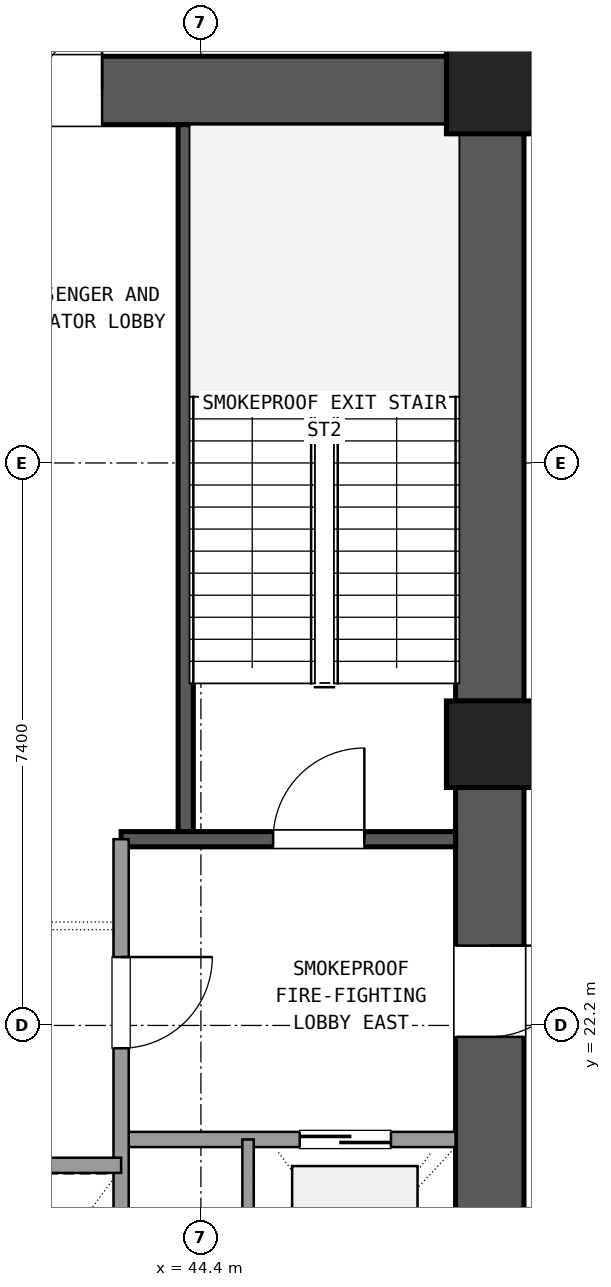
"""IFC4 building model, lengths in metres.
Left out: names, types, materials, properties, quantities, classifications, styles, units other than length and angle.
Written with IfcOpenShell. Run it as: python <this file> out.ifc"""

import sys

from ifc_helpers import new_model, si_unit, direction, frame, frame_2d, origin, origin_2d, place, context, subcontext, project, spatial, rectangle, extrude, element, fill, save


model = new_model("IFC4")
c1 = context("Model", 3, precision=1e-05, world=origin(), true_north=direction((0.0, 1.0)))
c2 = subcontext(c1, "Body", "Model", "MODEL_VIEW")
j1 = project(units=[si_unit("LENGTHUNIT", "METRE"), si_unit("PLANEANGLEUNIT", "RADIAN")], contexts=[c1])
p1 = place(None, origin())
s1 = spatial("IfcSite", under=j1, at=p1, CompositionType="ELEMENT")
p2 = place(p1, origin())
s2 = spatial("IfcBuilding", under=s1, at=p2, CompositionType="ELEMENT")
p3 = place(p2, frame((0.0, 0.0, 18.9)))
s3 = spatial("IfcBuildingStorey", under=s2, at=p3, CompositionType="ELEMENT", Elevation=18.9)
for number, where, z_axis, x_axis in (
    (1, (48.2, 25.9, 0.0), (0.0, 0.0, 1.0), (1.0, 0.0, 0.0)),
    (2, (48.2, 34.5, 0.0), (0.0, 0.0, 1.0), (1.0, 0.0, 0.0)),
):
    element("IfcColumn", number, at=place(p3, frame(where, z_axis=z_axis, x_axis=x_axis)), inside=s3, PredefinedType="COLUMN", context=c2, shape_type="SweptSolid", body=[
        extrude(rectangle(XDim=1.14, YDim=1.14, at=origin_2d()), origin(), (0.0, 0.0, 1.0), 5.04),
    ])
p4 = place(p3, frame((48.2, 17.865, 0.0), z_axis=(0.0, 0.0, 1.0), x_axis=(0.0, 1.0, 0.0)))
e3 = element("IfcWall", 3, at=p4, inside=s3, PredefinedType="SHEAR", context=c2, shape_type="SweptSolid", body=[
    extrude(rectangle(XDim=7.47, YDim=0.9, at=frame_2d((3.735, 0.0))), origin(), (0.0, 0.0, 1.0), 4.76),
])
p5 = place(p4, frame((4.185, 0.0, 0.0)))
e4 = element("IfcOpeningElement", 4, at=p5, cuts=e3, PredefinedType="OPENING", context=c2, shape_type="SweptSolid", body=[
    extrude(rectangle(XDim=1.2, YDim=2.15, at=frame_2d((0.6, 1.075))), frame((0.0, 0.46, 0.0), z_axis=(0.0, -1.0, 0.0), x_axis=(1.0, 0.0, 0.0)), (0.0, 0.0, 1.0), 0.92),
])
p6 = place(p3, frame((48.2, 26.465, 0.0), z_axis=(0.0, 0.0, 1.0), x_axis=(0.0, 1.0, 0.0)))
e5 = element("IfcWall", 5, at=p6, inside=s3, PredefinedType="SHEAR", context=c2, shape_type="SweptSolid", body=[
    extrude(rectangle(XDim=7.47, YDim=0.9, at=frame_2d((3.735, 0.0))), origin(), (0.0, 0.0, 1.0), 4.76),
])
p7 = place(p3, frame((47.635, 34.5, 0.0), z_axis=(0.0, 0.0, 1.0), x_axis=(-1.0, 0.0, 0.0)))
e6 = element("IfcWall", 6, at=p7, inside=s3, PredefinedType="SHEAR", context=c2, shape_type="SweptSolid", body=[
    extrude(rectangle(XDim=10.07, YDim=0.9, at=frame_2d((5.035, 0.0))), origin(), (0.0, 0.0, 1.0), 4.76),
])
p8 = place(p7, frame((4.535, 0.0, 0.0)))
e7 = element("IfcOpeningElement", 7, at=p8, cuts=e6, PredefinedType="OPENING", context=c2, shape_type="SweptSolid", body=[
    extrude(rectangle(XDim=1.6, YDim=2.2, at=frame_2d((0.8, 1.1))), frame((0.0, 0.46, 0.0), z_axis=(0.0, -1.0, 0.0), x_axis=(1.0, 0.0, 0.0)), (0.0, 0.0, 1.0), 0.92),
])
p9 = place(p3, frame((44.2, 24.65, 0.0), z_axis=(0.0, 0.0, 1.0), x_axis=(0.0, 1.0, 0.0)))
e8 = element("IfcWall", 8, at=p9, inside=s3, PredefinedType="SHEAR", context=c2, shape_type="SweptSolid", body=[
    extrude(rectangle(XDim=9.4, YDim=0.2, at=frame_2d((4.7, 0.0))), origin(), (0.0, 0.0, 1.0), 4.76),
])
p10 = place(p3, frame((43.35, 24.65, 0.0), z_axis=(0.0, 0.0, 1.0), x_axis=(1.0, 0.0, 0.0)))
e9 = element("IfcWall", 9, at=p10, inside=s3, PredefinedType="SHEAR", context=c2, shape_type="SweptSolid", body=[
    extrude(rectangle(XDim=4.4, YDim=0.2, at=frame_2d((2.2, 0.0))), origin(), (0.0, 0.0, 1.0), 4.76),
])
p11 = place(p10, frame((2.0, 0.0, 0.0)))
e10 = element("IfcOpeningElement", 10, at=p11, cuts=e9, PredefinedType="OPENING", context=c2, shape_type="SweptSolid", body=[
    extrude(rectangle(XDim=1.2, YDim=2.15, at=frame_2d((0.6, 1.075))), frame((0.0, 0.11, 0.0), z_axis=(0.0, -1.0, 0.0), x_axis=(1.0, 0.0, 0.0)), (0.0, 0.0, 1.0), 0.22),
])
p12 = place(p3, frame((43.35, 20.7, 0.0), z_axis=(0.0, 0.0, 1.0), x_axis=(1.0, 0.0, 0.0)))
e11 = element("IfcWall", 11, at=p12, inside=s3, PredefinedType="SOLIDWALL", context=c2, shape_type="SweptSolid", body=[
    extrude(rectangle(XDim=4.4, YDim=0.2, at=frame_2d((2.2, 0.0))), origin(), (0.0, 0.0, 1.0), 3.13),
])
p13 = place(p12, frame((2.35, 0.0, 0.0)))
e12 = element("IfcOpeningElement", 12, at=p13, cuts=e11, PredefinedType="OPENING", context=c2, shape_type="SweptSolid", body=[
    extrude(rectangle(XDim=1.2, YDim=2.15, at=frame_2d((0.6, 1.075))), frame((0.0, 0.11, 0.0), z_axis=(0.0, -1.0, 0.0), x_axis=(1.0, 0.0, 0.0)), (0.0, 0.0, 1.0), 0.22),
])
p14 = place(p3, frame((43.35, 17.75, 0.0), z_axis=(0.0, 0.0, 1.0), x_axis=(0.0, 1.0, 0.0)))
e13 = element("IfcWall", 13, at=p14, inside=s3, PredefinedType="SOLIDWALL", context=c2, shape_type="SweptSolid", body=[
    extrude(rectangle(XDim=6.9, YDim=0.2, at=frame_2d((3.45, 0.0))), origin(), (0.0, 0.0, 1.0), 3.13),
])
p15 = place(p14, frame((4.15, 0.0, 0.0)))
e14 = element("IfcOpeningElement", 14, at=p15, cuts=e13, PredefinedType="OPENING", context=c2, shape_type="SweptSolid", body=[
    extrude(rectangle(XDim=1.2, YDim=2.15, at=frame_2d((0.6, 1.075))), frame((0.0, 0.11, 0.0), z_axis=(0.0, -1.0, 0.0), x_axis=(1.0, 0.0, 0.0)), (0.0, 0.0, 1.0), 0.22),
])
p16 = place(p3, frame((45.02, 17.75, 0.0), z_axis=(0.0, 0.0, 1.0), x_axis=(0.0, 1.0, 0.0)))
e15 = element("IfcWall", 15, at=p16, inside=s3, PredefinedType="PARTITIONING", context=c2, shape_type="SweptSolid", body=[
    extrude(rectangle(XDim=2.95, YDim=0.15, at=frame_2d((1.475, 0.0))), origin(), (0.0, 0.0, 1.0), 3.13),
])
p17 = place(p3, frame((37.25, 20.36, 0.0), z_axis=(0.0, 0.0, 1.0), x_axis=(1.0, 0.0, 0.0)))
e16 = element("IfcWall", 16, at=p17, inside=s3, PredefinedType="SOLIDWALL", context=c2, shape_type="SweptSolid", body=[
    extrude(rectangle(XDim=6.1, YDim=0.2, at=frame_2d((3.05, 0.0))), origin(), (0.0, 0.0, 1.0), 3.13),
])
p18 = place(p11, origin())
e17 = element("IfcDoor", 17, at=p18, inside=s3, OperationType="SINGLE_SWING_RIGHT", PredefinedType="DOOR", context=c2, shape_type="SweptSolid", body=[
    extrude(rectangle(XDim=1.2, YDim=2.15, at=frame_2d((0.6, 1.075))), frame((0.0, 0.025, 0.0), z_axis=(0.0, -1.0, 0.0), x_axis=(1.0, 0.0, 0.0)), (0.0, 0.0, 1.0), 0.05),
])
fill(e10, e17)
p19 = place(p13, origin())
e18 = element("IfcDoor", 18, at=p19, inside=s3, OperationType="SLIDING_TO_RIGHT", PredefinedType="DOOR", context=c2, shape_type="SweptSolid", body=[
    extrude(rectangle(XDim=1.2, YDim=2.15, at=frame_2d((0.6, 1.075))), frame((0.0, 0.025, 0.0), z_axis=(0.0, -1.0, 0.0), x_axis=(1.0, 0.0, 0.0)), (0.0, 0.0, 1.0), 0.05),
])
fill(e12, e18)
p20 = place(p15, frame((1.2, 0.0, 0.0), z_axis=(0.0, 0.0, 1.0), x_axis=(-1.0, 0.0, 0.0)))
e19 = element("IfcDoor", 19, at=p20, inside=s3, OperationType="SINGLE_SWING_RIGHT", PredefinedType="DOOR", context=c2, shape_type="SweptSolid", body=[
    extrude(rectangle(XDim=1.2, YDim=2.15, at=frame_2d((0.6, 1.075))), frame((0.0, 0.025, 0.0), z_axis=(0.0, -1.0, 0.0), x_axis=(1.0, 0.0, 0.0)), (0.0, 0.0, 1.0), 0.05),
])
fill(e14, e19)
p21 = place(p5, frame((1.2, 0.0, 0.0), z_axis=(0.0, 0.0, 1.0), x_axis=(-1.0, 0.0, 0.0)))
e20 = element("IfcDoor", 20, at=p21, inside=s3, OperationType="SINGLE_SWING_RIGHT", PredefinedType="DOOR", context=c2, shape_type="SweptSolid", body=[
    extrude(rectangle(XDim=1.2, YDim=2.15, at=frame_2d((0.6, 1.075))), frame((0.0, 0.025, 0.0), z_axis=(0.0, -1.0, 0.0), x_axis=(1.0, 0.0, 0.0)), (0.0, 0.0, 1.0), 0.05),
])
fill(e4, e20)
p22 = place(p8, frame((1.6, 0.0, 0.0), z_axis=(0.0, 0.0, 1.0), x_axis=(-1.0, 0.0, 0.0)))
e21 = element("IfcDoor", 21, at=p22, inside=s3, OperationType="DOUBLE_DOOR_SINGLE_SWING", PredefinedType="DOOR", context=c2, shape_type="SweptSolid", body=[
    extrude(rectangle(XDim=1.6, YDim=2.2, at=frame_2d((0.8, 1.1))), frame((0.0, 0.025, 0.0), z_axis=(0.0, -1.0, 0.0), x_axis=(1.0, 0.0, 0.0)), (0.0, 0.0, 1.0), 0.05),
])
fill(e7, e21)
save(model, sys.argv[1])
